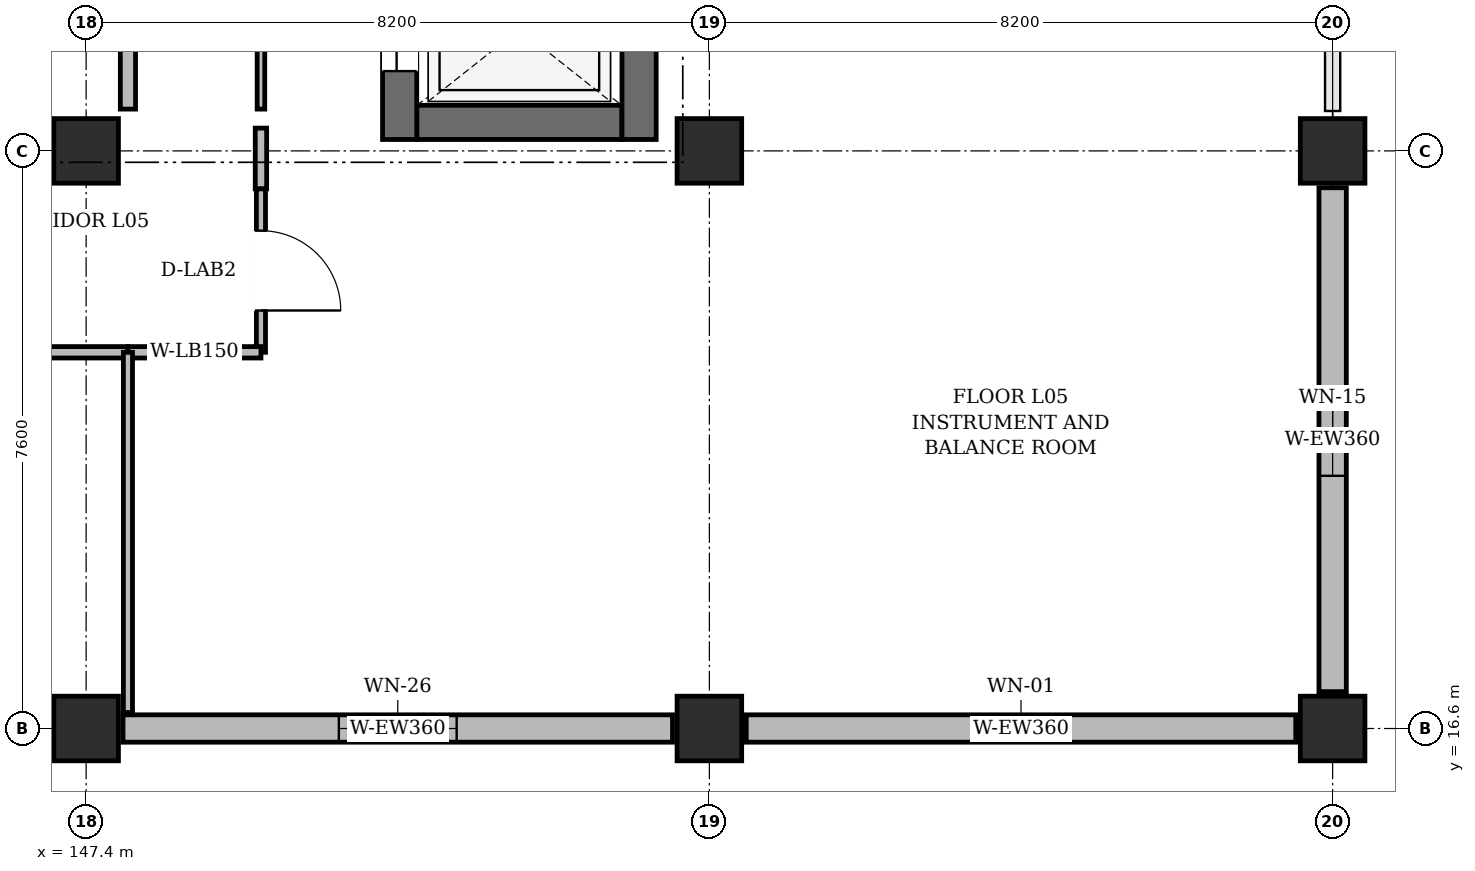
"""IFC4 building model, lengths in metres.
Left out: names, types, materials, properties, quantities, classifications, styles, units other than length and angle.
Written with IfcOpenShell. Run it as: python <this file> out.ifc"""

import sys

from ifc_helpers import new_model, si_unit, direction, frame, frame_2d, origin, origin_2d, place, context, subcontext, project, spatial, rectangle, extrude, element, fill, save


model = new_model("IFC4")
c1 = context("Model", 3, precision=1e-05, world=origin(), true_north=direction((0.0, 1.0)))
c2 = subcontext(c1, "Body", "Model", "MODEL_VIEW")
j1 = project(units=[si_unit("LENGTHUNIT", "METRE"), si_unit("PLANEANGLEUNIT", "RADIAN")], contexts=[c1])
p1 = place(None, origin())
s1 = spatial("IfcSite", under=j1, at=p1, CompositionType="ELEMENT")
p2 = place(p1, origin())
s2 = spatial("IfcBuilding", under=s1, at=p2, CompositionType="ELEMENT")
p3 = place(p2, frame((0.0, 0.0, 24.0)))
s3 = spatial("IfcBuildingStorey", under=s2, at=p3, CompositionType="ELEMENT", Elevation=24.0)
for number, where, z_axis, x_axis in (
    (1, (147.4, 16.6, 0.0), (0.0, 0.0, 1.0), (1.0, 0.0, 0.0)),
    (2, (147.4, 24.2, 0.0), (0.0, 0.0, 1.0), (1.0, 0.0, 0.0)),
    (3, (155.6, 16.6, 0.0), (0.0, 0.0, 1.0), (1.0, 0.0, 0.0)),
    (4, (155.6, 24.2, 0.0), (0.0, 0.0, 1.0), (1.0, 0.0, 0.0)),
    (5, (163.8, 16.6, 0.0), (0.0, 0.0, 1.0), (1.0, 0.0, 0.0)),
    (6, (163.8, 24.2, 0.0), (0.0, 0.0, 1.0), (1.0, 0.0, 0.0)),
):
    element("IfcColumn", number, at=place(p3, frame(where, z_axis=z_axis, x_axis=x_axis)), inside=s3, PredefinedType="COLUMN", context=c2, shape_type="SweptSolid", body=[
        extrude(rectangle(XDim=0.85, YDim=0.85, at=origin_2d()), origin(), (0.0, 0.0, 1.0), 3.93),
    ])
p4 = place(p3, frame((147.885, 16.6, 0.0), z_axis=(0.0, 0.0, 1.0), x_axis=(1.0, 0.0, 0.0)))
e7 = element("IfcWall", 7, at=p4, inside=s3, PredefinedType="SOLIDWALL", context=c2, shape_type="SweptSolid", body=[
    extrude(rectangle(XDim=7.23, YDim=0.36, at=frame_2d((3.615, 0.0))), origin(), (0.0, 0.0, 1.0), 3.315),
])
p5 = place(p4, frame((2.84, 0.0, 0.95)))
e8 = element("IfcOpeningElement", 8, at=p5, cuts=e7, PredefinedType="OPENING", context=c2, shape_type="SweptSolid", body=[
    extrude(rectangle(XDim=1.55, YDim=1.5, at=frame_2d((0.775, 0.75))), frame((0.0, 0.192, 0.0), z_axis=(0.0, -1.0, 0.0), x_axis=(1.0, 0.0, 0.0)), (0.0, 0.0, 1.0), 0.384),
])
p6 = place(p3, frame((156.085, 16.6, 0.0), z_axis=(0.0, 0.0, 1.0), x_axis=(1.0, 0.0, 0.0)))
e9 = element("IfcWall", 9, at=p6, inside=s3, PredefinedType="SOLIDWALL", context=c2, shape_type="SweptSolid", body=[
    extrude(rectangle(XDim=7.23, YDim=0.36, at=frame_2d((3.615, 0.0))), origin(), (0.0, 0.0, 1.0), 3.315),
])
p7 = place(p6, frame((3.165, 0.0, 0.95)))
e10 = element("IfcOpeningElement", 10, at=p7, cuts=e9, PredefinedType="OPENING", context=c2, shape_type="SweptSolid", body=[
    extrude(rectangle(XDim=0.9, YDim=2.1, at=frame_2d((0.45, 1.05))), frame((0.0, 0.192, 0.0), z_axis=(0.0, -1.0, 0.0), x_axis=(1.0, 0.0, 0.0)), (0.0, 0.0, 1.0), 0.384),
])
p8 = place(p3, frame((163.8, 17.085, 0.0), z_axis=(0.0, 0.0, 1.0), x_axis=(0.0, 1.0, 0.0)))
e11 = element("IfcWall", 11, at=p8, inside=s3, PredefinedType="SOLIDWALL", context=c2, shape_type="SweptSolid", body=[
    extrude(rectangle(XDim=6.63, YDim=0.36, at=frame_2d((3.315, 0.0))), origin(), (0.0, 0.0, 1.0), 3.315),
])
p9 = place(p8, frame((2.84, 0.0, 0.95)))
e12 = element("IfcOpeningElement", 12, at=p9, cuts=e11, PredefinedType="OPENING", context=c2, shape_type="SweptSolid", body=[
    extrude(rectangle(XDim=0.95, YDim=1.75, at=frame_2d((0.475, 0.875))), frame((0.0, 0.192, 0.0), z_axis=(0.0, -1.0, 0.0), x_axis=(1.0, 0.0, 0.0)), (0.0, 0.0, 1.0), 0.384),
])
p10 = place(p3, frame((151.75, 24.575, 0.0), z_axis=(0.0, 0.0, 1.0), x_axis=(1.0, 0.0, 0.0)))
e13 = element("IfcWall", 13, at=p10, inside=s3, PredefinedType="SHEAR", context=c2, shape_type="SweptSolid", body=[
    extrude(rectangle(XDim=2.7, YDim=0.45, at=frame_2d((1.35, 0.0))), origin(), (0.0, 0.0, 1.0), 3.93),
])
p11 = place(p3, frame((151.525, 24.35, 0.0), z_axis=(0.0, 0.0, 1.0), x_axis=(0.0, 1.0, 0.0)))
e14 = element("IfcWall", 14, at=p11, inside=s3, PredefinedType="SHEAR", context=c2, shape_type="SweptSolid", body=[
    extrude(rectangle(XDim=2.9, YDim=0.45, at=frame_2d((1.45, 0.0))), origin(), (0.0, 0.0, 1.0), 3.93),
])
p12 = place(p11, frame((0.9, 0.0, 0.0)))
e15 = element("IfcOpeningElement", 15, at=p12, cuts=e14, PredefinedType="OPENING", context=c2, shape_type="SweptSolid", body=[
    extrude(rectangle(XDim=1.1, YDim=2.2, at=frame_2d((0.55, 1.1))), frame((0.0, 0.237, 0.0), z_axis=(0.0, -1.0, 0.0), x_axis=(1.0, 0.0, 0.0)), (0.0, 0.0, 1.0), 0.474),
])
p13 = place(p3, frame((154.675, 24.35, 0.0), z_axis=(0.0, 0.0, 1.0), x_axis=(0.0, 1.0, 0.0)))
e16 = element("IfcWall", 16, at=p13, inside=s3, PredefinedType="SHEAR", context=c2, shape_type="SweptSolid", body=[
    extrude(rectangle(XDim=2.9, YDim=0.45, at=frame_2d((1.45, 0.0))), origin(), (0.0, 0.0, 1.0), 3.93),
])
p14 = place(p3, frame((147.95, 31.75, 0.0), z_axis=(0.0, 0.0, 1.0), x_axis=(0.0, -1.0, 0.0)))
e17 = element("IfcWall", 17, at=p14, inside=s3, PredefinedType="PARTITIONING", context=c2, shape_type="SweptSolid", body=[
    extrude(rectangle(XDim=7.0, YDim=0.2, at=frame_2d((3.5, 0.0))), origin(), (0.0, 0.0, 1.0), 3.805),
])
p15 = place(p14, frame((2.75, 0.0, 0.0)))
e18 = element("IfcOpeningElement", 18, at=p15, cuts=e17, PredefinedType="OPENING", context=c2, shape_type="SweptSolid", body=[
    extrude(rectangle(XDim=1.5, YDim=2.2, at=frame_2d((0.75, 1.1))), frame((0.0, 0.112, 0.0), z_axis=(0.0, -1.0, 0.0), x_axis=(1.0, 0.0, 0.0)), (0.0, 0.0, 1.0), 0.224),
])
p16 = place(p3, frame((149.7, 24.75, 0.0), z_axis=(0.0, 0.0, 1.0), x_axis=(0.0, 1.0, 0.0)))
e19 = element("IfcWall", 19, at=p16, inside=s3, PredefinedType="PARTITIONING", context=c2, shape_type="SweptSolid", body=[
    extrude(rectangle(XDim=11.3, YDim=0.1, at=frame_2d((5.65, 0.0))), origin(), (0.0, 0.0, 1.0), 3.805),
])
p17 = place(p16, frame((4.75, 0.0, 0.0)))
e20 = element("IfcOpeningElement", 20, at=p17, cuts=e19, PredefinedType="OPENING", context=c2, shape_type="SweptSolid", body=[
    extrude(rectangle(XDim=1.8, YDim=2.4, at=frame_2d((0.9, 1.2))), frame((0.0, 0.062, 0.0), z_axis=(0.0, -1.0, 0.0), x_axis=(1.0, 0.0, 0.0)), (0.0, 0.0, 1.0), 0.124),
])
p18 = place(p3, frame((147.95, 21.55, 0.0), z_axis=(0.0, 0.0, 1.0), x_axis=(-1.0, 0.0, 0.0)))
e21 = element("IfcWall", 21, at=p18, inside=s3, PredefinedType="PARTITIONING", context=c2, shape_type="SweptSolid", body=[
    extrude(rectangle(XDim=8.75, YDim=0.15, at=frame_2d((4.375, 0.0))), origin(), (0.0, 0.0, 1.0), 3.505),
])
p19 = place(p18, frame((3.675, 0.0, 0.0)))
e22 = element("IfcOpeningElement", 22, at=p19, cuts=e21, PredefinedType="OPENING", context=c2, shape_type="SweptSolid", body=[
    extrude(rectangle(XDim=1.4, YDim=2.2, at=frame_2d((0.7, 1.1))), frame((0.0, 0.087, 0.0), z_axis=(0.0, -1.0, 0.0), x_axis=(1.0, 0.0, 0.0)), (0.0, 0.0, 1.0), 0.174),
])
p20 = place(p3, frame((149.7, 24.5, 0.0), z_axis=(0.0, 0.0, 1.0), x_axis=(0.0, -1.0, 0.0)))
e23 = element("IfcWall", 23, at=p20, inside=s3, PredefinedType="PARTITIONING", context=c2, shape_type="SweptSolid", body=[
    extrude(rectangle(XDim=0.8, YDim=0.15, at=frame_2d((0.4, 0.0))), origin(), (0.0, 0.0, 1.0), 3.805),
])
p21 = place(p3, frame((149.7, 23.7, 0.0), z_axis=(0.0, 0.0, 1.0), x_axis=(0.0, -1.0, 0.0)))
e24 = element("IfcWall", 24, at=p21, inside=s3, PredefinedType="PARTITIONING", context=c2, shape_type="SweptSolid", body=[
    extrude(rectangle(XDim=2.15, YDim=0.12, at=frame_2d((1.075, 0.0))), origin(), (0.0, 0.0, 1.0), 3.805),
])
p22 = place(p21, frame((0.55, 0.0, 0.0)))
e25 = element("IfcOpeningElement", 25, at=p22, cuts=e24, PredefinedType="OPENING", context=c2, shape_type="SweptSolid", body=[
    extrude(rectangle(XDim=1.05, YDim=2.2, at=frame_2d((0.525, 1.1))), frame((0.0, 0.072, 0.0), z_axis=(0.0, -1.0, 0.0), x_axis=(1.0, 0.0, 0.0)), (0.0, 0.0, 1.0), 0.144),
])
p23 = place(p3, frame((149.7, 21.55, 0.0), z_axis=(0.0, 0.0, 1.0), x_axis=(-1.0, 0.0, 0.0)))
e26 = element("IfcWall", 26, at=p23, inside=s3, PredefinedType="PARTITIONING", context=c2, shape_type="SweptSolid", body=[
    extrude(rectangle(XDim=1.75, YDim=0.15, at=frame_2d((0.875, 0.0))), origin(), (0.0, 0.0, 1.0), 3.505),
])
p24 = place(p3, frame((147.95, 21.55, 0.0), z_axis=(0.0, 0.0, 1.0), x_axis=(0.0, -1.0, 0.0)))
e27 = element("IfcWall", 27, at=p24, inside=s3, PredefinedType="PARTITIONING", context=c2, shape_type="SweptSolid", body=[
    extrude(rectangle(XDim=4.74, YDim=0.12, at=frame_2d((2.37, 0.0))), origin(), (0.0, 0.0, 1.0), 3.805),
])
p25 = place(p5, origin())
e28 = element("IfcWindow", 28, at=p25, inside=s3, PartitioningType="DOUBLE_PANEL_VERTICAL", PredefinedType="WINDOW", context=c2, shape_type="SweptSolid", body=[
    extrude(rectangle(XDim=1.55, YDim=1.5, at=frame_2d((0.775, 0.75))), frame((0.0, 0.03, 0.0), z_axis=(0.0, -1.0, 0.0), x_axis=(1.0, 0.0, 0.0)), (0.0, 0.0, 1.0), 0.06),
])
fill(e8, e28)
p26 = place(p7, origin())
e29 = element("IfcWindow", 29, at=p26, inside=s3, PartitioningType="SINGLE_PANEL", PredefinedType="WINDOW", context=c2, shape_type="SweptSolid", body=[
    extrude(rectangle(XDim=0.9, YDim=2.1, at=frame_2d((0.45, 1.05))), frame((0.0, 0.03, 0.0), z_axis=(0.0, -1.0, 0.0), x_axis=(1.0, 0.0, 0.0)), (0.0, 0.0, 1.0), 0.06),
])
fill(e10, e29)
p27 = place(p9, origin())
e30 = element("IfcWindow", 30, at=p27, inside=s3, PartitioningType="SINGLE_PANEL", PredefinedType="WINDOW", context=c2, shape_type="SweptSolid", body=[
    extrude(rectangle(XDim=0.95, YDim=1.75, at=frame_2d((0.475, 0.875))), frame((0.0, 0.03, 0.0), z_axis=(0.0, -1.0, 0.0), x_axis=(1.0, 0.0, 0.0)), (0.0, 0.0, 1.0), 0.06),
])
fill(e12, e30)
p28 = place(p12, origin())
e31 = element("IfcDoor", 31, at=p28, inside=s3, OperationType="DOUBLE_DOOR_SLIDING", PredefinedType="DOOR", context=c2, shape_type="SweptSolid", body=[
    extrude(rectangle(XDim=1.1, YDim=2.2, at=frame_2d((0.55, 1.1))), frame((0.0, 0.025, 0.0), z_axis=(0.0, -1.0, 0.0), x_axis=(1.0, 0.0, 0.0)), (0.0, 0.0, 1.0), 0.05),
])
fill(e15, e31)
p29 = place(p22, origin())
e32 = element("IfcDoor", 32, at=p29, inside=s3, OperationType="SINGLE_SWING_RIGHT", PredefinedType="DOOR", context=c2, shape_type="SweptSolid", body=[
    extrude(rectangle(XDim=1.05, YDim=2.2, at=frame_2d((0.525, 1.1))), frame((0.0, 0.025, 0.0), z_axis=(0.0, -1.0, 0.0), x_axis=(1.0, 0.0, 0.0)), (0.0, 0.0, 1.0), 0.05),
])
fill(e25, e32)
save(model, sys.argv[1])
